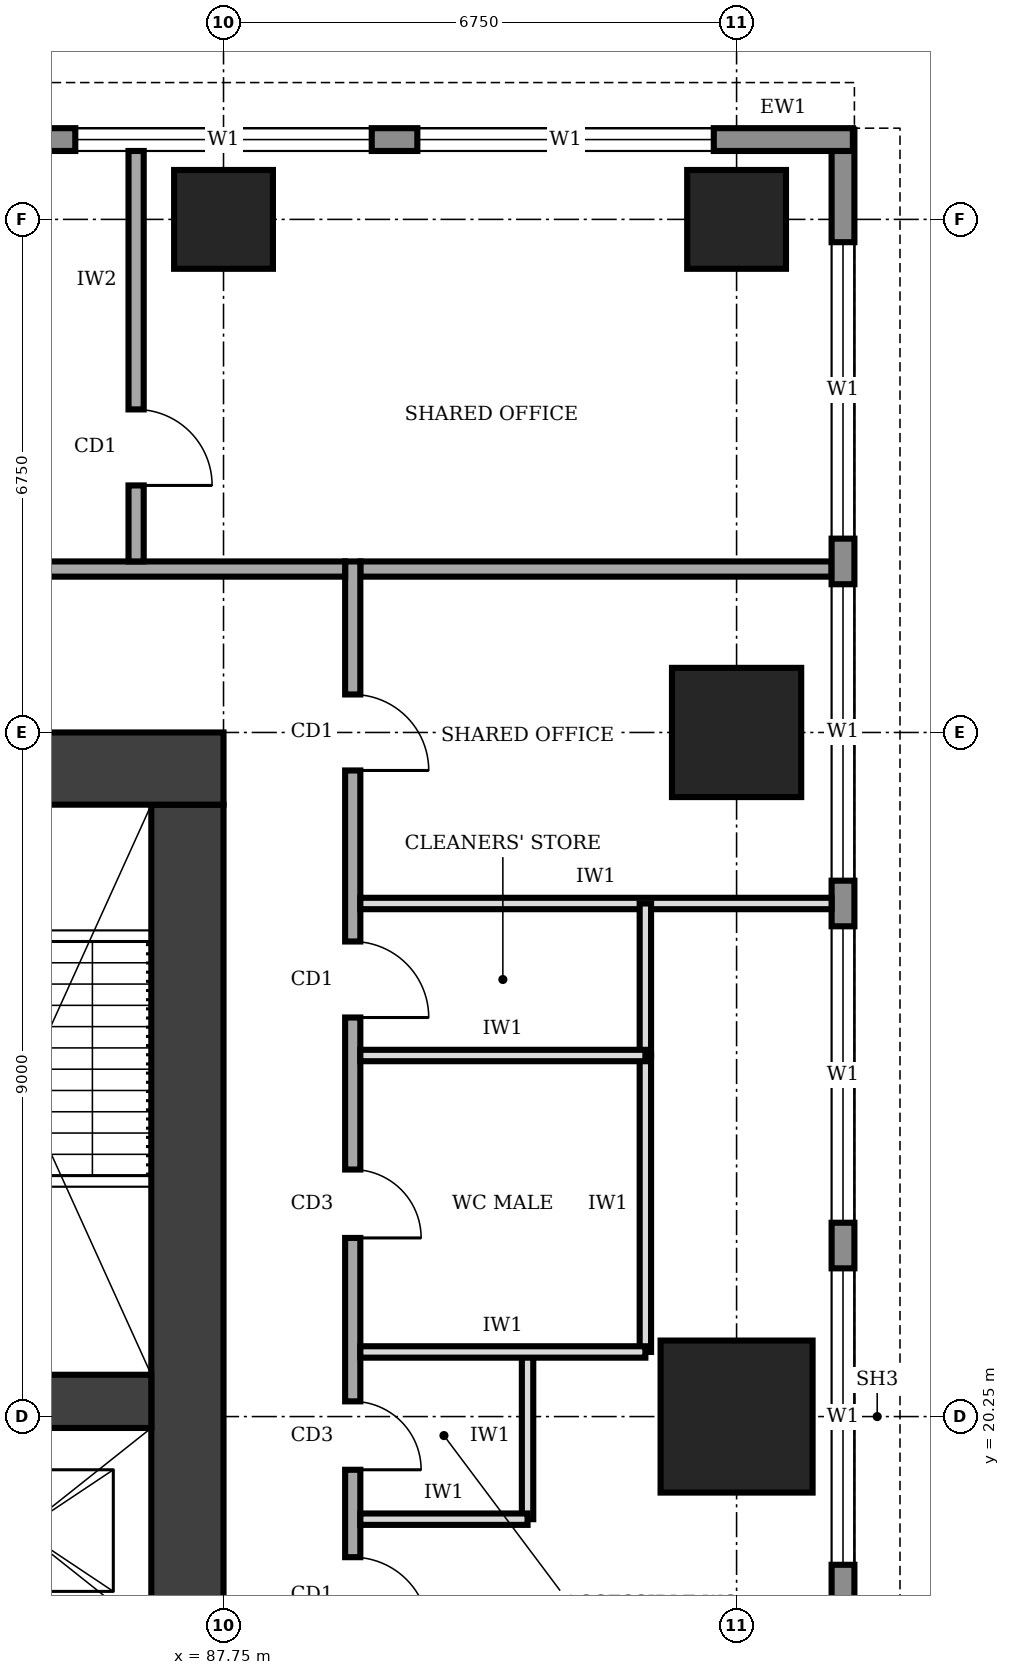
"""IFC4 building model, lengths in metres.
Left out: names, types, materials, properties, quantities, classifications, styles, units other than length and angle.
Written with IfcOpenShell. Run it as: python <this file> out.ifc"""

import sys

from ifc_helpers import new_model, si_unit, direction, frame, frame_2d, origin, origin_2d, place, context, subcontext, project, spatial, rectangle, extrude, element, fill, save


model = new_model("IFC4")
c1 = context("Model", 3, precision=1e-05, world=origin(), true_north=direction((0.0, 1.0)))
c2 = subcontext(c1, "Body", "Model", "MODEL_VIEW")
j1 = project(units=[si_unit("LENGTHUNIT", "METRE"), si_unit("PLANEANGLEUNIT", "RADIAN")], contexts=[c1])
p1 = place(None, origin())
s1 = spatial("IfcSite", under=j1, at=p1, CompositionType="ELEMENT")
p2 = place(p1, origin())
s2 = spatial("IfcBuilding", under=s1, at=p2, CompositionType="ELEMENT")
p3 = place(p2, frame((0.0, 0.0, 213.0)))
s3 = spatial("IfcBuildingStorey", under=s2, at=p3, CompositionType="ELEMENT", Elevation=213.0)
p4 = place(p3, frame((87.275, 12.2, 0.0), z_axis=(0.0, 0.0, 1.0), x_axis=(0.0, 1.0, 0.0)))
e1 = element("IfcWall", 1, at=p4, inside=s3, PredefinedType="SHEAR", context=c2, shape_type="SweptSolid", body=[
    extrude(rectangle(XDim=16.1, YDim=0.95, at=frame_2d((8.05, 0.0))), origin(), (0.0, 0.0, 1.0), 4.0),
])
p5 = place(p3, frame((87.75, 28.775, 0.0), z_axis=(0.0, 0.0, 1.0), x_axis=(-1.0, 0.0, 0.0)))
e2 = element("IfcWall", 2, at=p5, inside=s3, PredefinedType="SHEAR", context=c2, shape_type="SweptSolid", body=[
    extrude(rectangle(XDim=13.5, YDim=0.95, at=frame_2d((6.75, 0.0))), origin(), (0.0, 0.0, 1.0), 4.0),
])
p6 = place(p5, frame((4.75, 0.0, 0.0)))
e3 = element("IfcOpeningElement", 3, at=p6, cuts=e2, PredefinedType="OPENING", context=c2, shape_type="SweptSolid", body=[
    extrude(rectangle(XDim=1.8, YDim=2.1, at=frame_2d((0.9, 1.05))), frame((0.0, 0.485, 0.0), z_axis=(0.0, -1.0, 0.0), x_axis=(1.0, 0.0, 0.0)), (0.0, 0.0, 1.0), 0.97),
])
p7 = place(p3, frame((83.4, 20.45, 0.0), z_axis=(0.0, 0.0, 1.0), x_axis=(1.0, 0.0, 0.0)))
e4 = element("IfcWall", 4, at=p7, inside=s3, PredefinedType="SHEAR", context=c2, shape_type="SweptSolid", body=[
    extrude(rectangle(XDim=3.4, YDim=0.7, at=frame_2d((1.7, 0.0))), origin(), (0.0, 0.0, 1.0), 4.0),
])
p8 = place(p3, frame((94.5, 20.25, 0.0), z_axis=(0.0, 0.0, 1.0), x_axis=(1.0, 0.0, 0.0)))
e5 = element("IfcColumn", 5, at=p8, inside=s3, PredefinedType="COLUMN", context=c2, shape_type="SweptSolid", body=[
    extrude(rectangle(XDim=2.0, YDim=2.0, at=origin_2d()), origin(), (0.0, 0.0, 1.0), 4.0),
])
p9 = place(p3, frame((94.5, 29.25, 0.0), z_axis=(0.0, 0.0, 1.0), x_axis=(1.0, 0.0, 0.0)))
e6 = element("IfcColumn", 6, at=p9, inside=s3, PredefinedType="COLUMN", context=c2, shape_type="SweptSolid", body=[
    extrude(rectangle(XDim=1.7, YDim=1.7, at=origin_2d()), origin(), (0.0, 0.0, 1.0), 4.0),
])
for number, where, z_axis, x_axis in (
    (7, (87.75, 36.0, 0.0), (0.0, 0.0, 1.0), (1.0, 0.0, 0.0)),
    (8, (94.5, 36.0, 0.0), (0.0, 0.0, 1.0), (1.0, 0.0, 0.0)),
):
    element("IfcColumn", number, at=place(p3, frame(where, z_axis=z_axis, x_axis=x_axis)), inside=s3, PredefinedType="COLUMN", context=c2, shape_type="SweptSolid", body=[
        extrude(rectangle(XDim=1.3, YDim=1.3, at=origin_2d()), origin(), (0.0, 0.0, 1.0), 4.0),
    ])
p10 = place(p3, frame((95.9, 3.32, 0.0), z_axis=(0.0, 0.0, 1.0), x_axis=(0.0, 1.0, 0.0)))
e9 = element("IfcWall", 9, at=p10, inside=s3, PredefinedType="STANDARD", context=c2, shape_type="SweptSolid", body=[
    extrude(rectangle(XDim=33.86, YDim=0.3, at=frame_2d((16.93, 0.0))), origin(), (0.0, 0.0, 1.0), 3.75),
])
p11 = place(p10, frame((1.48, 0.0, 0.9)))
e10 = element("IfcOpeningElement", 10, at=p11, cuts=e9, PredefinedType="OPENING", context=c2, shape_type="SweptSolid", body=[
    extrude(rectangle(XDim=3.9, YDim=2.2, at=frame_2d((1.95, 1.1))), frame((0.0, 0.16, 0.0), z_axis=(0.0, -1.0, 0.0), x_axis=(1.0, 0.0, 0.0)), (0.0, 0.0, 1.0), 0.32),
])
p12 = place(p10, frame((5.98, 0.0, 0.9)))
e11 = element("IfcOpeningElement", 11, at=p12, cuts=e9, PredefinedType="OPENING", context=c2, shape_type="SweptSolid", body=[
    extrude(rectangle(XDim=3.9, YDim=2.2, at=frame_2d((1.95, 1.1))), frame((0.0, 0.16, 0.0), z_axis=(0.0, -1.0, 0.0), x_axis=(1.0, 0.0, 0.0)), (0.0, 0.0, 1.0), 0.32),
])
p13 = place(p10, frame((10.48, 0.0, 0.9)))
e12 = element("IfcOpeningElement", 12, at=p13, cuts=e9, PredefinedType="OPENING", context=c2, shape_type="SweptSolid", body=[
    extrude(rectangle(XDim=3.9, YDim=2.2, at=frame_2d((1.95, 1.1))), frame((0.0, 0.16, 0.0), z_axis=(0.0, -1.0, 0.0), x_axis=(1.0, 0.0, 0.0)), (0.0, 0.0, 1.0), 0.32),
])
p14 = place(p10, frame((14.98, 0.0, 0.9)))
e13 = element("IfcOpeningElement", 13, at=p14, cuts=e9, PredefinedType="OPENING", context=c2, shape_type="SweptSolid", body=[
    extrude(rectangle(XDim=3.9, YDim=2.2, at=frame_2d((1.95, 1.1))), frame((0.0, 0.16, 0.0), z_axis=(0.0, -1.0, 0.0), x_axis=(1.0, 0.0, 0.0)), (0.0, 0.0, 1.0), 0.32),
])
p15 = place(p10, frame((19.48, 0.0, 0.9)))
e14 = element("IfcOpeningElement", 14, at=p15, cuts=e9, PredefinedType="OPENING", context=c2, shape_type="SweptSolid", body=[
    extrude(rectangle(XDim=3.9, YDim=2.2, at=frame_2d((1.95, 1.1))), frame((0.0, 0.16, 0.0), z_axis=(0.0, -1.0, 0.0), x_axis=(1.0, 0.0, 0.0)), (0.0, 0.0, 1.0), 0.32),
])
p16 = place(p10, frame((23.98, 0.0, 0.9)))
e15 = element("IfcOpeningElement", 15, at=p16, cuts=e9, PredefinedType="OPENING", context=c2, shape_type="SweptSolid", body=[
    extrude(rectangle(XDim=3.9, YDim=2.2, at=frame_2d((1.95, 1.1))), frame((0.0, 0.16, 0.0), z_axis=(0.0, -1.0, 0.0), x_axis=(1.0, 0.0, 0.0)), (0.0, 0.0, 1.0), 0.32),
])
p17 = place(p10, frame((28.48, 0.0, 0.9)))
e16 = element("IfcOpeningElement", 16, at=p17, cuts=e9, PredefinedType="OPENING", context=c2, shape_type="SweptSolid", body=[
    extrude(rectangle(XDim=3.9, YDim=2.2, at=frame_2d((1.95, 1.1))), frame((0.0, 0.16, 0.0), z_axis=(0.0, -1.0, 0.0), x_axis=(1.0, 0.0, 0.0)), (0.0, 0.0, 1.0), 0.32),
])
p18 = place(p3, frame((96.03, 37.05, 0.0), z_axis=(0.0, 0.0, 1.0), x_axis=(-1.0, 0.0, 0.0)))
e17 = element("IfcWall", 17, at=p18, inside=s3, PredefinedType="STANDARD", context=c2, shape_type="SweptSolid", body=[
    extrude(rectangle(XDim=29.91, YDim=0.3, at=frame_2d((14.955, 0.0))), origin(), (0.0, 0.0, 1.0), 3.75),
])
p19 = place(p18, frame((24.33, 0.0, 0.9)))
e18 = element("IfcOpeningElement", 18, at=p19, cuts=e17, PredefinedType="OPENING", context=c2, shape_type="SweptSolid", body=[
    extrude(rectangle(XDim=3.9, YDim=2.2, at=frame_2d((1.95, 1.1))), frame((0.0, 0.16, 0.0), z_axis=(0.0, -1.0, 0.0), x_axis=(1.0, 0.0, 0.0)), (0.0, 0.0, 1.0), 0.32),
])
p20 = place(p18, frame((19.83, 0.0, 0.9)))
e19 = element("IfcOpeningElement", 19, at=p20, cuts=e17, PredefinedType="OPENING", context=c2, shape_type="SweptSolid", body=[
    extrude(rectangle(XDim=3.9, YDim=2.2, at=frame_2d((1.95, 1.1))), frame((0.0, 0.16, 0.0), z_axis=(0.0, -1.0, 0.0), x_axis=(1.0, 0.0, 0.0)), (0.0, 0.0, 1.0), 0.32),
])
p21 = place(p18, frame((15.33, 0.0, 0.9)))
e20 = element("IfcOpeningElement", 20, at=p21, cuts=e17, PredefinedType="OPENING", context=c2, shape_type="SweptSolid", body=[
    extrude(rectangle(XDim=3.9, YDim=2.2, at=frame_2d((1.95, 1.1))), frame((0.0, 0.16, 0.0), z_axis=(0.0, -1.0, 0.0), x_axis=(1.0, 0.0, 0.0)), (0.0, 0.0, 1.0), 0.32),
])
p22 = place(p18, frame((10.83, 0.0, 0.9)))
e21 = element("IfcOpeningElement", 21, at=p22, cuts=e17, PredefinedType="OPENING", context=c2, shape_type="SweptSolid", body=[
    extrude(rectangle(XDim=3.9, YDim=2.2, at=frame_2d((1.95, 1.1))), frame((0.0, 0.16, 0.0), z_axis=(0.0, -1.0, 0.0), x_axis=(1.0, 0.0, 0.0)), (0.0, 0.0, 1.0), 0.32),
])
p23 = place(p18, frame((6.33, 0.0, 0.9)))
e22 = element("IfcOpeningElement", 22, at=p23, cuts=e17, PredefinedType="OPENING", context=c2, shape_type="SweptSolid", body=[
    extrude(rectangle(XDim=3.9, YDim=2.2, at=frame_2d((1.95, 1.1))), frame((0.0, 0.16, 0.0), z_axis=(0.0, -1.0, 0.0), x_axis=(1.0, 0.0, 0.0)), (0.0, 0.0, 1.0), 0.32),
])
p24 = place(p18, frame((1.83, 0.0, 0.9)))
e23 = element("IfcOpeningElement", 23, at=p24, cuts=e17, PredefinedType="OPENING", context=c2, shape_type="SweptSolid", body=[
    extrude(rectangle(XDim=3.9, YDim=2.2, at=frame_2d((1.95, 1.1))), frame((0.0, 0.16, 0.0), z_axis=(0.0, -1.0, 0.0), x_axis=(1.0, 0.0, 0.0)), (0.0, 0.0, 1.0), 0.32),
])
p25 = place(p3, frame((89.45, 7.7, 0.0), z_axis=(0.0, 0.0, 1.0), x_axis=(0.0, 1.0, 0.0)))
e24 = element("IfcWall", 24, at=p25, inside=s3, PredefinedType="SOLIDWALL", context=c2, shape_type="SweptSolid", body=[
    extrude(rectangle(XDim=23.8, YDim=0.2, at=frame_2d((11.9, 0.0))), origin(), (0.0, 0.0, 1.0), 3.75),
])
p26 = place(p25, frame((2.3, 0.0, 0.0)))
e25 = element("IfcOpeningElement", 25, at=p26, cuts=e24, PredefinedType="OPENING", context=c2, shape_type="SweptSolid", body=[
    extrude(rectangle(XDim=1.0, YDim=2.1, at=frame_2d((0.5, 1.05))), frame((0.0, 0.11, 0.0), z_axis=(0.0, -1.0, 0.0), x_axis=(1.0, 0.0, 0.0)), (0.0, 0.0, 1.0), 0.22),
])
p27 = place(p25, frame((7.05, 0.0, 0.0)))
e26 = element("IfcOpeningElement", 26, at=p27, cuts=e24, PredefinedType="OPENING", context=c2, shape_type="SweptSolid", body=[
    extrude(rectangle(XDim=0.9, YDim=2.1, at=frame_2d((0.45, 1.05))), frame((0.0, 0.11, 0.0), z_axis=(0.0, -1.0, 0.0), x_axis=(1.0, 0.0, 0.0)), (0.0, 0.0, 1.0), 0.22),
])
p28 = place(p25, frame((11.85, 0.0, 0.0)))
e27 = element("IfcOpeningElement", 27, at=p28, cuts=e24, PredefinedType="OPENING", context=c2, shape_type="SweptSolid", body=[
    extrude(rectangle(XDim=0.9, YDim=2.1, at=frame_2d((0.45, 1.05))), frame((0.0, 0.11, 0.0), z_axis=(0.0, -1.0, 0.0), x_axis=(1.0, 0.0, 0.0)), (0.0, 0.0, 1.0), 0.22),
])
p29 = place(p25, frame((14.9, 0.0, 0.0)))
e28 = element("IfcOpeningElement", 28, at=p29, cuts=e24, PredefinedType="OPENING", context=c2, shape_type="SweptSolid", body=[
    extrude(rectangle(XDim=0.9, YDim=2.1, at=frame_2d((0.45, 1.05))), frame((0.0, 0.11, 0.0), z_axis=(0.0, -1.0, 0.0), x_axis=(1.0, 0.0, 0.0)), (0.0, 0.0, 1.0), 0.22),
])
p30 = place(p25, frame((17.8, 0.0, 0.0)))
e29 = element("IfcOpeningElement", 29, at=p30, cuts=e24, PredefinedType="OPENING", context=c2, shape_type="SweptSolid", body=[
    extrude(rectangle(XDim=1.0, YDim=2.1, at=frame_2d((0.5, 1.05))), frame((0.0, 0.11, 0.0), z_axis=(0.0, -1.0, 0.0), x_axis=(1.0, 0.0, 0.0)), (0.0, 0.0, 1.0), 0.22),
])
p31 = place(p25, frame((9.7, 0.0, 0.0)))
e30 = element("IfcOpeningElement", 30, at=p31, cuts=e24, PredefinedType="OPENING", context=c2, shape_type="SweptSolid", body=[
    extrude(rectangle(XDim=1.0, YDim=2.1, at=frame_2d((0.5, 1.05))), frame((0.0, 0.11, 0.0), z_axis=(0.0, -1.0, 0.0), x_axis=(1.0, 0.0, 0.0)), (0.0, 0.0, 1.0), 0.22),
])
p32 = place(p25, frame((21.05, 0.0, 0.0)))
e31 = element("IfcOpeningElement", 31, at=p32, cuts=e24, PredefinedType="OPENING", context=c2, shape_type="SweptSolid", body=[
    extrude(rectangle(XDim=1.0, YDim=2.1, at=frame_2d((0.5, 1.05))), frame((0.0, 0.11, 0.0), z_axis=(0.0, -1.0, 0.0), x_axis=(1.0, 0.0, 0.0)), (0.0, 0.0, 1.0), 0.22),
])
p33 = place(p3, frame((89.35, 31.4, 0.0), z_axis=(0.0, 0.0, 1.0), x_axis=(-1.0, 0.0, 0.0)))
e32 = element("IfcWall", 32, at=p33, inside=s3, PredefinedType="SOLIDWALL", context=c2, shape_type="SweptSolid", body=[
    extrude(rectangle(XDim=16.9, YDim=0.2, at=frame_2d((8.45, 0.0))), origin(), (0.0, 0.0, 1.0), 3.75),
])
p34 = place(p33, frame((14.375, 0.0, 0.0)))
e33 = element("IfcOpeningElement", 33, at=p34, cuts=e32, PredefinedType="OPENING", context=c2, shape_type="SweptSolid", body=[
    extrude(rectangle(XDim=1.0, YDim=2.1, at=frame_2d((0.5, 1.05))), frame((0.0, 0.11, 0.0), z_axis=(0.0, -1.0, 0.0), x_axis=(1.0, 0.0, 0.0)), (0.0, 0.0, 1.0), 0.22),
])
p35 = place(p33, frame((10.1, 0.0, 0.0)))
e34 = element("IfcOpeningElement", 34, at=p35, cuts=e32, PredefinedType="OPENING", context=c2, shape_type="SweptSolid", body=[
    extrude(rectangle(XDim=1.0, YDim=2.1, at=frame_2d((0.5, 1.05))), frame((0.0, 0.11, 0.0), z_axis=(0.0, -1.0, 0.0), x_axis=(1.0, 0.0, 0.0)), (0.0, 0.0, 1.0), 0.22),
])
p36 = place(p3, frame((86.6, 36.9, 0.0), z_axis=(0.0, 0.0, 1.0), x_axis=(0.0, -1.0, 0.0)))
e35 = element("IfcWall", 35, at=p36, inside=s3, PredefinedType="SOLIDWALL", context=c2, shape_type="SweptSolid", body=[
    extrude(rectangle(XDim=5.4, YDim=0.2, at=frame_2d((2.7, 0.0))), origin(), (0.0, 0.0, 1.0), 3.75),
])
p37 = place(p36, frame((3.4, 0.0, 0.0)))
e36 = element("IfcOpeningElement", 36, at=p37, cuts=e35, PredefinedType="OPENING", context=c2, shape_type="SweptSolid", body=[
    extrude(rectangle(XDim=1.0, YDim=2.1, at=frame_2d((0.5, 1.05))), frame((0.0, 0.11, 0.0), z_axis=(0.0, -1.0, 0.0), x_axis=(1.0, 0.0, 0.0)), (0.0, 0.0, 1.0), 0.22),
])
p38 = place(p3, frame((89.55, 31.4, 0.0), z_axis=(0.0, 0.0, 1.0), x_axis=(1.0, 0.0, 0.0)))
e37 = element("IfcWall", 37, at=p38, inside=s3, PredefinedType="SOLIDWALL", context=c2, shape_type="SweptSolid", body=[
    extrude(rectangle(XDim=6.2, YDim=0.2, at=frame_2d((3.1, 0.0))), origin(), (0.0, 0.0, 1.0), 3.75),
])
p39 = place(p3, frame((89.55, 27.0, 0.0), z_axis=(0.0, 0.0, 1.0), x_axis=(1.0, 0.0, 0.0)))
e38 = element("IfcWall", 38, at=p39, inside=s3, PredefinedType="PARTITIONING", context=c2, shape_type="SweptSolid", body=[
    extrude(rectangle(XDim=6.2, YDim=0.15, at=frame_2d((3.1, 0.0))), origin(), (0.0, 0.0, 1.0), 3.75),
])
p40 = place(p3, frame((89.55, 18.9, 0.0), z_axis=(0.0, 0.0, 1.0), x_axis=(1.0, 0.0, 0.0)))
e39 = element("IfcWall", 39, at=p40, inside=s3, PredefinedType="PARTITIONING", context=c2, shape_type="SweptSolid", body=[
    extrude(rectangle(XDim=2.2, YDim=0.15, at=frame_2d((1.1, 0.0))), origin(), (0.0, 0.0, 1.0), 3.75),
])
p41 = place(p3, frame((89.55, 21.1, 0.0), z_axis=(0.0, 0.0, 1.0), x_axis=(1.0, 0.0, 0.0)))
e40 = element("IfcWall", 40, at=p41, inside=s3, PredefinedType="PARTITIONING", context=c2, shape_type="SweptSolid", body=[
    extrude(rectangle(XDim=3.75, YDim=0.15, at=frame_2d((1.875, 0.0))), origin(), (0.0, 0.0, 1.0), 2.85),
])
p42 = place(p3, frame((89.55, 25.0, 0.0), z_axis=(0.0, 0.0, 1.0), x_axis=(1.0, 0.0, 0.0)))
e41 = element("IfcWall", 41, at=p42, inside=s3, PredefinedType="PARTITIONING", context=c2, shape_type="SweptSolid", body=[
    extrude(rectangle(XDim=3.75, YDim=0.15, at=frame_2d((1.875, 0.0))), origin(), (0.0, 0.0, 1.0), 3.75),
])
p43 = place(p3, frame((91.75, 18.9, 0.0), z_axis=(0.0, 0.0, 1.0), x_axis=(0.0, 1.0, 0.0)))
e42 = element("IfcWall", 42, at=p43, inside=s3, PredefinedType="PARTITIONING", context=c2, shape_type="SweptSolid", body=[
    extrude(rectangle(XDim=2.2, YDim=0.15, at=frame_2d((1.1, 0.0))), origin(), (0.0, 0.0, 1.0), 3.75),
])
p44 = place(p3, frame((93.3, 21.1, 0.0), z_axis=(0.0, 0.0, 1.0), x_axis=(0.0, 1.0, 0.0)))
e43 = element("IfcWall", 43, at=p44, inside=s3, PredefinedType="PARTITIONING", context=c2, shape_type="SweptSolid", body=[
    extrude(rectangle(XDim=3.9, YDim=0.15, at=frame_2d((1.95, 0.0))), origin(), (0.0, 0.0, 1.0), 3.75),
])
p45 = place(p3, frame((93.3, 25.0, 0.0), z_axis=(0.0, 0.0, 1.0), x_axis=(0.0, 1.0, 0.0)))
e44 = element("IfcWall", 44, at=p45, inside=s3, PredefinedType="PARTITIONING", context=c2, shape_type="SweptSolid", body=[
    extrude(rectangle(XDim=2.0, YDim=0.15, at=frame_2d((1.0, 0.0))), origin(), (0.0, 0.0, 1.0), 3.75),
])
p46 = place(p14, origin())
e45 = element("IfcWindow", 45, at=p46, inside=s3, PartitioningType="SINGLE_PANEL", PredefinedType="WINDOW", context=c2, shape_type="SweptSolid", body=[
    extrude(rectangle(XDim=3.9, YDim=2.2, at=frame_2d((1.95, 1.1))), frame((0.0, 0.03, 0.0), z_axis=(0.0, -1.0, 0.0), x_axis=(1.0, 0.0, 0.0)), (0.0, 0.0, 1.0), 0.06),
])
fill(e13, e45)
p47 = place(p15, origin())
e46 = element("IfcWindow", 46, at=p47, inside=s3, PartitioningType="SINGLE_PANEL", PredefinedType="WINDOW", context=c2, shape_type="SweptSolid", body=[
    extrude(rectangle(XDim=3.9, YDim=2.2, at=frame_2d((1.95, 1.1))), frame((0.0, 0.03, 0.0), z_axis=(0.0, -1.0, 0.0), x_axis=(1.0, 0.0, 0.0)), (0.0, 0.0, 1.0), 0.06),
])
fill(e14, e46)
p48 = place(p16, origin())
e47 = element("IfcWindow", 47, at=p48, inside=s3, PartitioningType="SINGLE_PANEL", PredefinedType="WINDOW", context=c2, shape_type="SweptSolid", body=[
    extrude(rectangle(XDim=3.9, YDim=2.2, at=frame_2d((1.95, 1.1))), frame((0.0, 0.03, 0.0), z_axis=(0.0, -1.0, 0.0), x_axis=(1.0, 0.0, 0.0)), (0.0, 0.0, 1.0), 0.06),
])
fill(e15, e47)
p49 = place(p17, origin())
e48 = element("IfcWindow", 48, at=p49, inside=s3, PartitioningType="SINGLE_PANEL", PredefinedType="WINDOW", context=c2, shape_type="SweptSolid", body=[
    extrude(rectangle(XDim=3.9, YDim=2.2, at=frame_2d((1.95, 1.1))), frame((0.0, 0.03, 0.0), z_axis=(0.0, -1.0, 0.0), x_axis=(1.0, 0.0, 0.0)), (0.0, 0.0, 1.0), 0.06),
])
fill(e16, e48)
p50 = place(p23, origin())
e49 = element("IfcWindow", 49, at=p50, inside=s3, PartitioningType="SINGLE_PANEL", PredefinedType="WINDOW", context=c2, shape_type="SweptSolid", body=[
    extrude(rectangle(XDim=3.9, YDim=2.2, at=frame_2d((1.95, 1.1))), frame((0.0, 0.03, 0.0), z_axis=(0.0, -1.0, 0.0), x_axis=(1.0, 0.0, 0.0)), (0.0, 0.0, 1.0), 0.06),
])
fill(e22, e49)
p51 = place(p24, origin())
e50 = element("IfcWindow", 50, at=p51, inside=s3, PartitioningType="SINGLE_PANEL", PredefinedType="WINDOW", context=c2, shape_type="SweptSolid", body=[
    extrude(rectangle(XDim=3.9, YDim=2.2, at=frame_2d((1.95, 1.1))), frame((0.0, 0.03, 0.0), z_axis=(0.0, -1.0, 0.0), x_axis=(1.0, 0.0, 0.0)), (0.0, 0.0, 1.0), 0.06),
])
fill(e23, e50)
p52 = place(p28, frame((0.9, 0.0, 0.0), z_axis=(0.0, 0.0, 1.0), x_axis=(-1.0, 0.0, 0.0)))
e51 = element("IfcDoor", 51, at=p52, inside=s3, OperationType="SINGLE_SWING_RIGHT", PredefinedType="DOOR", context=c2, shape_type="SweptSolid", body=[
    extrude(rectangle(XDim=0.9, YDim=2.1, at=frame_2d((0.45, 1.05))), frame((0.0, 0.025, 0.0), z_axis=(0.0, -1.0, 0.0), x_axis=(1.0, 0.0, 0.0)), (0.0, 0.0, 1.0), 0.05),
])
fill(e27, e51)
p53 = place(p29, frame((0.9, 0.0, 0.0), z_axis=(0.0, 0.0, 1.0), x_axis=(-1.0, 0.0, 0.0)))
e52 = element("IfcDoor", 52, at=p53, inside=s3, OperationType="SINGLE_SWING_RIGHT", PredefinedType="DOOR", context=c2, shape_type="SweptSolid", body=[
    extrude(rectangle(XDim=0.9, YDim=2.1, at=frame_2d((0.45, 1.05))), frame((0.0, 0.025, 0.0), z_axis=(0.0, -1.0, 0.0), x_axis=(1.0, 0.0, 0.0)), (0.0, 0.0, 1.0), 0.05),
])
fill(e28, e52)
p54 = place(p30, frame((1.0, 0.0, 0.0), z_axis=(0.0, 0.0, 1.0), x_axis=(-1.0, 0.0, 0.0)))
e53 = element("IfcDoor", 53, at=p54, inside=s3, OperationType="SINGLE_SWING_RIGHT", PredefinedType="DOOR", context=c2, shape_type="SweptSolid", body=[
    extrude(rectangle(XDim=1.0, YDim=2.1, at=frame_2d((0.5, 1.05))), frame((0.0, 0.025, 0.0), z_axis=(0.0, -1.0, 0.0), x_axis=(1.0, 0.0, 0.0)), (0.0, 0.0, 1.0), 0.05),
])
fill(e29, e53)
p55 = place(p31, frame((1.0, 0.0, 0.0), z_axis=(0.0, 0.0, 1.0), x_axis=(-1.0, 0.0, 0.0)))
e54 = element("IfcDoor", 54, at=p55, inside=s3, OperationType="SINGLE_SWING_RIGHT", PredefinedType="DOOR", context=c2, shape_type="SweptSolid", body=[
    extrude(rectangle(XDim=1.0, YDim=2.1, at=frame_2d((0.5, 1.05))), frame((0.0, 0.025, 0.0), z_axis=(0.0, -1.0, 0.0), x_axis=(1.0, 0.0, 0.0)), (0.0, 0.0, 1.0), 0.05),
])
fill(e30, e54)
p56 = place(p32, frame((1.0, 0.0, 0.0), z_axis=(0.0, 0.0, 1.0), x_axis=(-1.0, 0.0, 0.0)))
e55 = element("IfcDoor", 55, at=p56, inside=s3, OperationType="SINGLE_SWING_RIGHT", PredefinedType="DOOR", context=c2, shape_type="SweptSolid", body=[
    extrude(rectangle(XDim=1.0, YDim=2.1, at=frame_2d((0.5, 1.05))), frame((0.0, 0.025, 0.0), z_axis=(0.0, -1.0, 0.0), x_axis=(1.0, 0.0, 0.0)), (0.0, 0.0, 1.0), 0.05),
])
fill(e31, e55)
p57 = place(p37, origin())
e56 = element("IfcDoor", 56, at=p57, inside=s3, OperationType="SINGLE_SWING_RIGHT", PredefinedType="DOOR", context=c2, shape_type="SweptSolid", body=[
    extrude(rectangle(XDim=1.0, YDim=2.1, at=frame_2d((0.5, 1.05))), frame((0.0, 0.025, 0.0), z_axis=(0.0, -1.0, 0.0), x_axis=(1.0, 0.0, 0.0)), (0.0, 0.0, 1.0), 0.05),
])
fill(e36, e56)
save(model, sys.argv[1])
